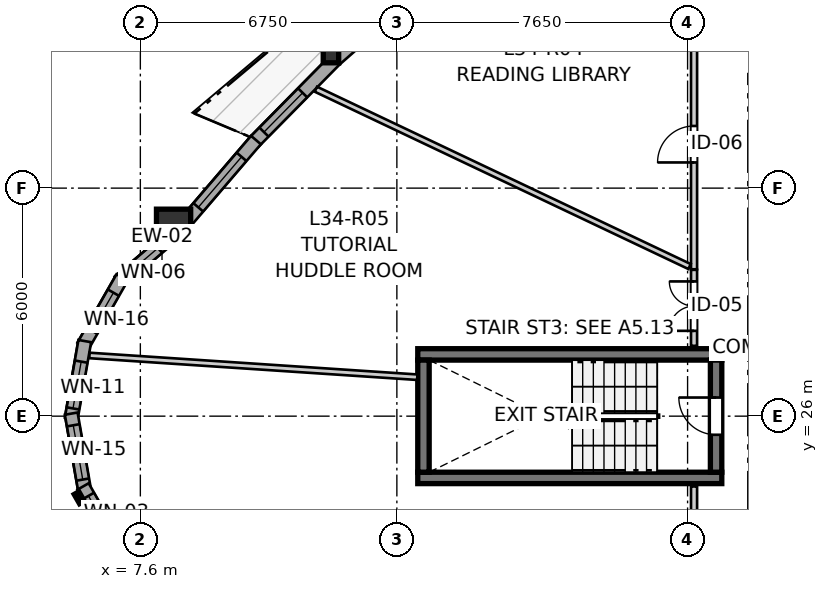
"""IFC4 building model, lengths in metres.
Left out: names, types, materials, properties, quantities, classifications, styles, units other than length and angle.
Written with IfcOpenShell. Run it as: python <this file> out.ifc"""

import sys

from ifc_helpers import new_model, si_unit, direction, frame, frame_2d, origin, origin_2d, place, context, subcontext, project, spatial, rectangle, i_section, extrude, source, transform, mapped, element, fill, save


model = new_model("IFC4")
c1 = context("Model", 3, precision=1e-05, world=origin(), true_north=direction((0.0, 1.0)))
c2 = subcontext(c1, "Body", "Model", "MODEL_VIEW")
j1 = project(units=[si_unit("LENGTHUNIT", "METRE"), si_unit("PLANEANGLEUNIT", "RADIAN")], contexts=[c1])
p1 = place(None, origin())
s1 = spatial("IfcSite", under=j1, at=p1, CompositionType="ELEMENT")
p2 = place(p1, origin())
s2 = spatial("IfcBuilding", under=s1, at=p2, CompositionType="ELEMENT")
p3 = place(p2, frame((0.0, 0.0, 115.2)))
s3 = spatial("IfcBuildingStorey", under=s2, at=p3, CompositionType="ELEMENT", Elevation=115.2)
for number, where, z_axis, x_axis in (
    (1, (14.9, 24.375, 0.0), (0.0, 0.0, 1.0), (1.0, 0.0, 0.0)),
    (2, (22.9, 27.625, 0.0), (0.0, 0.0, 1.0), (-1.0, 0.0, 0.0)),
):
    element("IfcWall", number, at=place(p3, frame(where, z_axis=z_axis, x_axis=x_axis)), inside=s3, PredefinedType="SHEAR", context=c2, shape_type="SweptSolid", body=[
        extrude(rectangle(XDim=8.0, YDim=0.3, at=frame_2d((4.0, 0.0))), origin(), (0.0, 0.0, 1.0), 2.95),
    ])
p4 = place(p3, frame((15.05, 27.475, 0.0), z_axis=(0.0, 0.0, 1.0), x_axis=(0.0, -1.0, 0.0)))
e3 = element("IfcWall", 3, at=p4, inside=s3, PredefinedType="SHEAR", context=c2, shape_type="SweptSolid", body=[
    extrude(rectangle(XDim=2.95, YDim=0.3, at=frame_2d((1.475, 0.0))), origin(), (0.0, 0.0, 1.0), 2.95),
])
p5 = place(p3, frame((22.75, 24.525, 0.0), z_axis=(0.0, 0.0, 1.0), x_axis=(0.0, 1.0, 0.0)))
e4 = element("IfcWall", 4, at=p5, inside=s3, PredefinedType="SHEAR", context=c2, shape_type="SweptSolid", body=[
    extrude(rectangle(XDim=2.95, YDim=0.3, at=frame_2d((1.475, 0.0))), origin(), (0.0, 0.0, 1.0), 2.95),
])
p6 = place(p5, frame((0.985, 0.0, 0.0)))
e5 = element("IfcOpeningElement", 5, at=p6, cuts=e4, PredefinedType="OPENING", context=c2, shape_type="SweptSolid", body=[
    extrude(rectangle(XDim=0.98, YDim=2.15, at=frame_2d((0.49, 1.075))), frame((0.0, 0.16, 0.0), z_axis=(0.0, -1.0, 0.0), x_axis=(1.0, 0.0, 0.0)), (0.0, 0.0, 1.0), 0.32),
])
m1 = source(origin(), c2, "Body", "SweptSolid", [
    extrude(rectangle(XDim=0.9, YDim=0.9, at=origin_2d()), origin(), (0.0, 0.0, 1.0), 2.95),
])
p7 = place(p3, frame((8.474, 30.996, 0.0), z_axis=(0.0, 0.0, 1.0), x_axis=(1.0, 0.0, 0.0)))
e6 = element("IfcColumn", 6, at=p7, inside=s3, PredefinedType="COLUMN", context=c2, shape_type="MappedRepresentation", body=[
    mapped(m1, transform((0.0, 0.0, 0.0), x_axis=(1.0, 0.0, 0.0), y_axis=(0.0, 1.0, 0.0), z_axis=(0.0, 0.0, 1.0), scale=1.0)),
])
m2 = source(origin(), c2, "Body", "SweptSolid", [
    extrude(i_section(OverallWidth=0.406, OverallDepth=0.416, WebThickness=0.027, FlangeThickness=0.044, FilletRadius=0.015, at=origin_2d()), origin(), (0.0, 0.0, 1.0), 2.95),
])
p8 = place(p3, frame((12.616, 35.505, 0.0), z_axis=(0.0, 0.0, 1.0), x_axis=(1.0, 0.0, 0.0)))
e7 = element("IfcColumn", 7, at=p8, inside=s3, PredefinedType="PILASTER", context=c2, shape_type="MappedRepresentation", body=[
    mapped(m2, transform((0.0, 0.0, 0.0), x_axis=(1.0, 0.0, 0.0), y_axis=(0.0, 1.0, 0.0), z_axis=(0.0, 0.0, 1.0), scale=1.0)),
])
p9 = place(p3, frame((8.409, 30.718, 0.0), z_axis=(0.0, 0.0, 1.0), x_axis=(-0.761134405886, -0.648594184507, 0.0)))
e8 = element("IfcWall", 8, at=p9, inside=s3, PredefinedType="SOLIDWALL", context=c2, shape_type="SweptSolid", body=[
    extrude(rectangle(XDim=1.805, YDim=0.34, at=frame_2d((0.902, 0.0))), origin(), (0.0, 0.0, 1.0), 2.48),
])
p10 = place(p9, frame((0.452, 0.0, 0.82)))
e9 = element("IfcOpeningElement", 9, at=p10, cuts=e8, PredefinedType="OPENING", context=c2, shape_type="SweptSolid", body=[
    extrude(rectangle(XDim=1.05, YDim=1.45, at=frame_2d((0.525, 0.725))), frame((0.0, 0.18, 0.0), z_axis=(0.0, -1.0, 0.0), x_axis=(1.0, 0.0, 0.0)), (0.0, 0.0, 1.0), 0.36),
])
p11 = place(p3, frame((7.121, 29.65, 0.0), z_axis=(0.0, 0.0, 1.0), x_axis=(-0.496037473582, -0.868301114132, 0.0)))
e10 = element("IfcWall", 10, at=p11, inside=s3, PredefinedType="SOLIDWALL", context=c2, shape_type="SweptSolid", body=[
    extrude(rectangle(XDim=2.073, YDim=0.34, at=frame_2d((1.037, 0.0))), origin(), (0.0, 0.0, 1.0), 2.48),
])
p12 = place(p11, frame((0.461, 0.0, 0.82)))
e11 = element("IfcOpeningElement", 11, at=p12, cuts=e10, PredefinedType="OPENING", context=c2, shape_type="SweptSolid", body=[
    extrude(rectangle(XDim=1.15, YDim=1.2, at=frame_2d((0.575, 0.6))), frame((0.0, 0.18, 0.0), z_axis=(0.0, -1.0, 0.0), x_axis=(1.0, 0.0, 0.0)), (0.0, 0.0, 1.0), 0.36),
])
p13 = place(p3, frame((6.138, 27.975, 0.0), z_axis=(0.0, 0.0, 1.0), x_axis=(-0.172186061474, -0.985064444711, 0.0)))
e12 = element("IfcWall", 12, at=p13, inside=s3, PredefinedType="SOLIDWALL", context=c2, shape_type="SweptSolid", body=[
    extrude(rectangle(XDim=2.073, YDim=0.34, at=frame_2d((1.037, 0.0))), origin(), (0.0, 0.0, 1.0), 2.48),
])
p14 = place(p13, frame((0.549, 0.0, 0.82)))
e13 = element("IfcOpeningElement", 13, at=p14, cuts=e12, PredefinedType="OPENING", context=c2, shape_type="SweptSolid", body=[
    extrude(rectangle(XDim=1.25, YDim=1.35, at=frame_2d((0.625, 0.675))), frame((0.0, 0.18, 0.0), z_axis=(0.0, -1.0, 0.0), x_axis=(1.0, 0.0, 0.0)), (0.0, 0.0, 1.0), 0.36),
])
p15 = place(p3, frame((5.781, 26.067, 0.0), z_axis=(0.0, 0.0, 1.0), x_axis=(0.172186061474, -0.985064444711, 0.0)))
e14 = element("IfcWall", 14, at=p15, inside=s3, PredefinedType="SOLIDWALL", context=c2, shape_type="SweptSolid", body=[
    extrude(rectangle(XDim=2.073, YDim=0.34, at=frame_2d((1.037, 0.0))), origin(), (0.0, 0.0, 1.0), 2.48),
])
p16 = place(p15, frame((0.312, 0.0, 0.82)))
e15 = element("IfcOpeningElement", 15, at=p16, cuts=e14, PredefinedType="OPENING", context=c2, shape_type="SweptSolid", body=[
    extrude(rectangle(XDim=1.45, YDim=1.25, at=frame_2d((0.725, 0.625))), frame((0.0, 0.18, 0.0), z_axis=(0.0, -1.0, 0.0), x_axis=(1.0, 0.0, 0.0)), (0.0, 0.0, 1.0), 0.36),
])
p17 = place(p3, frame((6.092, 24.15, 0.0), z_axis=(0.0, 0.0, 1.0), x_axis=(0.496037473582, -0.868301114132, 0.0)))
e16 = element("IfcWall", 16, at=p17, inside=s3, PredefinedType="SOLIDWALL", context=c2, shape_type="SweptSolid", body=[
    extrude(rectangle(XDim=2.073, YDim=0.34, at=frame_2d((1.037, 0.0))), origin(), (0.0, 0.0, 1.0), 2.48),
])
p18 = place(p17, frame((0.287, 0.0, 0.82)))
e17 = element("IfcOpeningElement", 17, at=p18, cuts=e16, PredefinedType="OPENING", context=c2, shape_type="SweptSolid", body=[
    extrude(rectangle(XDim=1.5, YDim=1.45, at=frame_2d((0.75, 0.725))), frame((0.0, 0.18, 0.0), z_axis=(0.0, -1.0, 0.0), x_axis=(1.0, 0.0, 0.0)), (0.0, 0.0, 1.0), 0.36),
])
p19 = place(p3, frame((14.997, 37.37, 0.0), z_axis=(0.0, 0.0, 1.0), x_axis=(-0.751446130796, -0.659794447166, 0.0)))
e18 = element("IfcWall", 18, at=p19, inside=s3, PredefinedType="SOLIDWALL", context=c2, shape_type="SweptSolid", body=[
    extrude(rectangle(XDim=3.0, YDim=0.34, at=frame_2d((1.5, 0.0))), origin(), (0.0, 0.0, 1.0), 2.48),
])
p20 = place(p19, frame((1.035, 0.0, 0.82)))
e19 = element("IfcOpeningElement", 19, at=p20, cuts=e18, PredefinedType="OPENING", context=c2, shape_type="SweptSolid", body=[
    extrude(rectangle(XDim=0.95, YDim=1.35, at=frame_2d((0.475, 0.675))), frame((0.0, 0.18, 0.0), z_axis=(0.0, -1.0, 0.0), x_axis=(1.0, 0.0, 0.0)), (0.0, 0.0, 1.0), 0.36),
])
p21 = place(p3, frame((12.723, 35.372, 0.0), z_axis=(0.0, 0.0, 1.0), x_axis=(-0.701922597509, -0.71225323243, 0.0)))
e20 = element("IfcWall", 20, at=p21, inside=s3, PredefinedType="SOLIDWALL", context=c2, shape_type="SweptSolid", body=[
    extrude(rectangle(XDim=3.049, YDim=0.34, at=frame_2d((1.524, 0.0))), origin(), (0.0, 0.0, 1.0), 2.48),
])
p22 = place(p21, frame((1.214, 0.0, 0.82)))
e21 = element("IfcOpeningElement", 21, at=p22, cuts=e20, PredefinedType="OPENING", context=c2, shape_type="SweptSolid", body=[
    extrude(rectangle(XDim=1.45, YDim=1.25, at=frame_2d((0.725, 0.625))), frame((0.0, 0.18, 0.0), z_axis=(0.0, -1.0, 0.0), x_axis=(1.0, 0.0, 0.0)), (0.0, 0.0, 1.0), 0.36),
])
p23 = place(p3, frame((10.642, 33.265, 0.0), z_axis=(0.0, 0.0, 1.0), x_axis=(-0.650694416433, -0.759339697647, 0.0)))
e22 = element("IfcWall", 22, at=p23, inside=s3, PredefinedType="SOLIDWALL", context=c2, shape_type="SweptSolid", body=[
    extrude(rectangle(XDim=2.903, YDim=0.34, at=frame_2d((1.452, 0.0))), origin(), (0.0, 0.0, 1.0), 2.48),
])
p24 = place(p23, frame((0.582, 0.0, 0.82)))
e23 = element("IfcOpeningElement", 23, at=p24, cuts=e22, PredefinedType="OPENING", context=c2, shape_type="SweptSolid", body=[
    extrude(rectangle(XDim=1.75, YDim=1.3, at=frame_2d((0.875, 0.65))), frame((0.0, 0.18, 0.0), z_axis=(0.0, -1.0, 0.0), x_axis=(1.0, 0.0, 0.0)), (0.0, 0.0, 1.0), 0.36),
])
p25 = place(p3, frame((22.17, 29.865, 0.0), z_axis=(0.0, 0.0, 1.0), x_axis=(0.0, 1.0, 0.0)))
e24 = element("IfcWall", 24, at=p25, inside=s3, PredefinedType="PARTITIONING", context=c2, shape_type="SweptSolid", body=[
    extrude(rectangle(XDim=6.565, YDim=0.16, at=frame_2d((3.282, 0.0))), origin(), (0.0, 0.0, 1.0), 2.95),
])
p26 = place(p25, frame((2.811, 0.0, 0.0)))
e25 = element("IfcOpeningElement", 25, at=p26, cuts=e24, PredefinedType="OPENING", context=c2, shape_type="SweptSolid", body=[
    extrude(rectangle(XDim=0.96, YDim=2.1, at=frame_2d((0.48, 1.05))), frame((0.0, 0.09, 0.0), z_axis=(0.0, -1.0, 0.0), x_axis=(1.0, 0.0, 0.0)), (0.0, 0.0, 1.0), 0.18),
])
p27 = place(p3, frame((22.17, 20.14, 0.0), z_axis=(0.0, 0.0, 1.0), x_axis=(0.0, 1.0, 0.0)))
e26 = element("IfcWall", 26, at=p27, inside=s3, PredefinedType="PARTITIONING", context=c2, shape_type="SweptSolid", body=[
    extrude(rectangle(XDim=4.01, YDim=0.16, at=frame_2d((2.005, 0.0))), origin(), (0.0, 0.0, 1.0), 2.95),
])
p28 = place(p27, frame((1.375, 0.0, 0.0)))
e27 = element("IfcOpeningElement", 27, at=p28, cuts=e26, PredefinedType="OPENING", context=c2, shape_type="SweptSolid", body=[
    extrude(rectangle(XDim=1.3, YDim=2.1, at=frame_2d((0.65, 1.05))), frame((0.0, 0.09, 0.0), z_axis=(0.0, -1.0, 0.0), x_axis=(1.0, 0.0, 0.0)), (0.0, 0.0, 1.0), 0.18),
])
p29 = place(p3, frame((22.17, 27.85, 0.0), z_axis=(0.0, 0.0, 1.0), x_axis=(0.0, 1.0, 0.0)))
e28 = element("IfcWall", 28, at=p29, inside=s3, PredefinedType="PARTITIONING", context=c2, shape_type="SweptSolid", body=[
    extrude(rectangle(XDim=2.0, YDim=0.16, at=frame_2d((1.0, 0.0))), origin(), (0.0, 0.0, 1.0), 2.95),
])
p30 = place(p29, frame((0.395, 0.0, 0.0)))
e29 = element("IfcOpeningElement", 29, at=p30, cuts=e28, PredefinedType="OPENING", context=c2, shape_type="SweptSolid", body=[
    extrude(rectangle(XDim=1.3, YDim=2.1, at=frame_2d((0.65, 1.05))), frame((0.0, 0.09, 0.0), z_axis=(0.0, -1.0, 0.0), x_axis=(1.0, 0.0, 0.0)), (0.0, 0.0, 1.0), 0.18),
])
p31 = place(p3, frame((12.219, 34.602, 0.0), z_axis=(0.0, 0.0, 1.0), x_axis=(0.90346129999, -0.428669662351, 0.0)))
e30 = element("IfcWall", 30, at=p31, inside=s3, PredefinedType="PARTITIONING", context=c2, shape_type="SweptSolid", body=[
    extrude(rectangle(XDim=10.883, YDim=0.145, at=frame_2d((5.441, 0.0))), origin(), (0.0, 0.0, 1.0), 2.95),
])
p32 = place(p3, frame((6.26, 27.597, 0.0), z_axis=(0.0, 0.0, 1.0), x_axis=(0.997805352235, -0.066215398902, 0.0)))
e31 = element("IfcWall", 31, at=p32, inside=s3, PredefinedType="PARTITIONING", context=c2, shape_type="SweptSolid", body=[
    extrude(rectangle(XDim=8.646, YDim=0.145, at=frame_2d((4.323, 0.0))), origin(), (0.0, 0.0, 1.0), 2.95),
])
m3 = source(origin(), c2, "Body", "SweptSolid", [
    extrude(rectangle(XDim=1.05, YDim=1.45, at=frame_2d((0.525, 0.725))), frame((0.0, 0.03, 0.0), z_axis=(0.0, -1.0, 0.0), x_axis=(1.0, 0.0, 0.0)), (0.0, 0.0, 1.0), 0.06),
])
p33 = place(p10, origin())
e32 = element("IfcWindow", 32, at=p33, inside=s3, PartitioningType="SINGLE_PANEL", PredefinedType="WINDOW", context=c2, shape_type="MappedRepresentation", body=[
    mapped(m3, transform((0.0, 0.0, 0.0), x_axis=(1.0, 0.0, 0.0), y_axis=(0.0, 1.0, 0.0), z_axis=(0.0, 0.0, 1.0), scale=1.0)),
])
fill(e9, e32)
m4 = source(origin(), c2, "Body", "SweptSolid", [
    extrude(rectangle(XDim=1.15, YDim=1.2, at=frame_2d((0.575, 0.6))), frame((0.0, 0.03, 0.0), z_axis=(0.0, -1.0, 0.0), x_axis=(1.0, 0.0, 0.0)), (0.0, 0.0, 1.0), 0.06),
])
p34 = place(p12, origin())
e33 = element("IfcWindow", 33, at=p34, inside=s3, PartitioningType="SINGLE_PANEL", PredefinedType="WINDOW", context=c2, shape_type="MappedRepresentation", body=[
    mapped(m4, transform((0.0, 0.0, 0.0), x_axis=(1.0, 0.0, 0.0), y_axis=(0.0, 1.0, 0.0), z_axis=(0.0, 0.0, 1.0), scale=1.0)),
])
fill(e11, e33)
m5 = source(origin(), c2, "Body", "SweptSolid", [
    extrude(rectangle(XDim=1.25, YDim=1.35, at=frame_2d((0.625, 0.675))), frame((0.0, 0.03, 0.0), z_axis=(0.0, -1.0, 0.0), x_axis=(1.0, 0.0, 0.0)), (0.0, 0.0, 1.0), 0.06),
])
p35 = place(p14, origin())
e34 = element("IfcWindow", 34, at=p35, inside=s3, PartitioningType="SINGLE_PANEL", PredefinedType="WINDOW", context=c2, shape_type="MappedRepresentation", body=[
    mapped(m5, transform((0.0, 0.0, 0.0), x_axis=(1.0, 0.0, 0.0), y_axis=(0.0, 1.0, 0.0), z_axis=(0.0, 0.0, 1.0), scale=1.0)),
])
fill(e13, e34)
m6 = source(origin(), c2, "Body", "SweptSolid", [
    extrude(rectangle(XDim=1.45, YDim=1.25, at=frame_2d((0.725, 0.625))), frame((0.0, 0.03, 0.0), z_axis=(0.0, -1.0, 0.0), x_axis=(1.0, 0.0, 0.0)), (0.0, 0.0, 1.0), 0.06),
])
p36 = place(p16, origin())
e35 = element("IfcWindow", 35, at=p36, inside=s3, PartitioningType="SINGLE_PANEL", PredefinedType="WINDOW", context=c2, shape_type="MappedRepresentation", body=[
    mapped(m6, transform((0.0, 0.0, 0.0), x_axis=(1.0, 0.0, 0.0), y_axis=(0.0, 1.0, 0.0), z_axis=(0.0, 0.0, 1.0), scale=1.0)),
])
fill(e15, e35)
m7 = source(origin(), c2, "Body", "SweptSolid", [
    extrude(rectangle(XDim=1.5, YDim=1.45, at=frame_2d((0.75, 0.725))), frame((0.0, 0.03, 0.0), z_axis=(0.0, -1.0, 0.0), x_axis=(1.0, 0.0, 0.0)), (0.0, 0.0, 1.0), 0.06),
])
p37 = place(p18, origin())
e36 = element("IfcWindow", 36, at=p37, inside=s3, PartitioningType="SINGLE_PANEL", PredefinedType="WINDOW", context=c2, shape_type="MappedRepresentation", body=[
    mapped(m7, transform((0.0, 0.0, 0.0), x_axis=(1.0, 0.0, 0.0), y_axis=(0.0, 1.0, 0.0), z_axis=(0.0, 0.0, 1.0), scale=1.0)),
])
fill(e17, e36)
p38 = place(p22, origin())
e37 = element("IfcWindow", 37, at=p38, inside=s3, PartitioningType="SINGLE_PANEL", PredefinedType="WINDOW", context=c2, shape_type="MappedRepresentation", body=[
    mapped(m6, transform((0.0, 0.0, 0.0), x_axis=(1.0, 0.0, 0.0), y_axis=(0.0, 1.0, 0.0), z_axis=(0.0, 0.0, 1.0), scale=1.0)),
])
fill(e21, e37)
m8 = source(origin(), c2, "Body", "SweptSolid", [
    extrude(rectangle(XDim=1.75, YDim=1.3, at=frame_2d((0.875, 0.65))), frame((0.0, 0.03, 0.0), z_axis=(0.0, -1.0, 0.0), x_axis=(1.0, 0.0, 0.0)), (0.0, 0.0, 1.0), 0.06),
])
p39 = place(p24, origin())
e38 = element("IfcWindow", 38, at=p39, inside=s3, PartitioningType="SINGLE_PANEL", PredefinedType="WINDOW", context=c2, shape_type="MappedRepresentation", body=[
    mapped(m8, transform((0.0, 0.0, 0.0), x_axis=(1.0, 0.0, 0.0), y_axis=(0.0, 1.0, 0.0), z_axis=(0.0, 0.0, 1.0), scale=1.0)),
])
fill(e23, e38)
m9 = source(origin(), c2, "Body", "SweptSolid", [
    extrude(rectangle(XDim=0.98, YDim=2.15, at=frame_2d((0.49, 1.075))), frame((0.0, 0.025, 0.0), z_axis=(0.0, -1.0, 0.0), x_axis=(1.0, 0.0, 0.0)), (0.0, 0.0, 1.0), 0.05),
])
p40 = place(p6, origin())
e39 = element("IfcDoor", 39, at=p40, inside=s3, OperationType="SINGLE_SWING_RIGHT", PredefinedType="DOOR", context=c2, shape_type="MappedRepresentation", body=[
    mapped(m9, transform((0.0, 0.0, 0.0), x_axis=(1.0, 0.0, 0.0), y_axis=(0.0, 1.0, 0.0), z_axis=(0.0, 0.0, 1.0), scale=1.0)),
])
fill(e5, e39)
m10 = source(origin(), c2, "Body", "SweptSolid", [
    extrude(rectangle(XDim=0.96, YDim=2.1, at=frame_2d((0.48, 1.05))), frame((0.0, 0.025, 0.0), z_axis=(0.0, -1.0, 0.0), x_axis=(1.0, 0.0, 0.0)), (0.0, 0.0, 1.0), 0.05),
])
p41 = place(p26, origin())
e40 = element("IfcDoor", 40, at=p41, inside=s3, OperationType="SINGLE_SWING_LEFT", PredefinedType="DOOR", context=c2, shape_type="MappedRepresentation", body=[
    mapped(m10, transform((0.0, 0.0, 0.0), x_axis=(1.0, 0.0, 0.0), y_axis=(0.0, 1.0, 0.0), z_axis=(0.0, 0.0, 1.0), scale=1.0)),
])
fill(e25, e40)
m11 = source(origin(), c2, "Body", "SweptSolid", [
    extrude(rectangle(XDim=1.3, YDim=2.1, at=frame_2d((0.65, 1.05))), frame((0.0, 0.025, 0.0), z_axis=(0.0, -1.0, 0.0), x_axis=(1.0, 0.0, 0.0)), (0.0, 0.0, 1.0), 0.05),
])
p42 = place(p30, origin())
e41 = element("IfcDoor", 41, at=p42, inside=s3, OperationType="DOUBLE_DOOR_SINGLE_SWING", PredefinedType="DOOR", context=c2, shape_type="MappedRepresentation", body=[
    mapped(m11, transform((0.0, 0.0, 0.0), x_axis=(1.0, 0.0, 0.0), y_axis=(0.0, 1.0, 0.0), z_axis=(0.0, 0.0, 1.0), scale=1.0)),
])
fill(e29, e41)
save(model, sys.argv[1])
